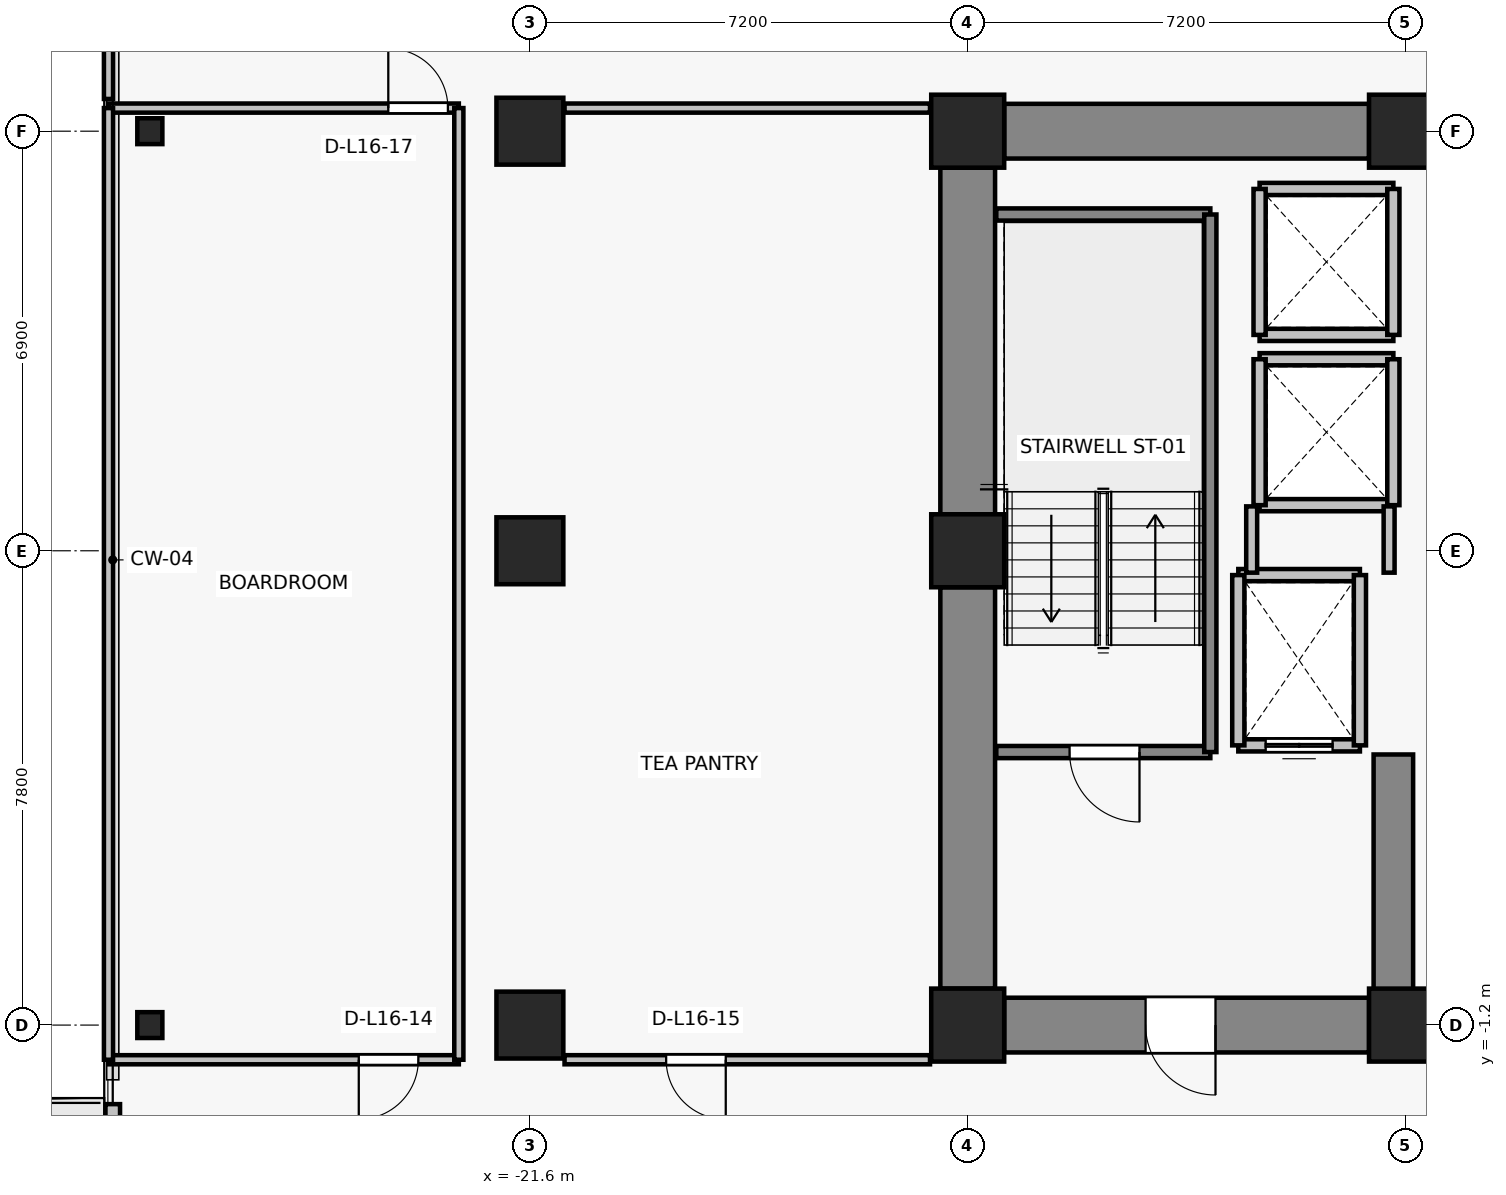
"""IFC4 building model, lengths in metres.
Left out: names, types, materials, properties, quantities, classifications, styles, units other than length and angle.
Written with IfcOpenShell. Run it as: python <this file> out.ifc"""

import sys

from ifc_helpers import new_model, si_unit, direction, frame, frame_2d, origin, origin_2d, place, context, subcontext, project, spatial, rectangle, i_section, extrude, source, transform, mapped, element, fill, save


model = new_model("IFC4")
c1 = context("Model", 3, precision=1e-05, world=origin(), true_north=direction((0.0, 1.0)))
c2 = subcontext(c1, "Body", "Model", "MODEL_VIEW")
j1 = project(units=[si_unit("LENGTHUNIT", "METRE"), si_unit("PLANEANGLEUNIT", "RADIAN")], contexts=[c1])
p1 = place(None, origin())
s1 = spatial("IfcSite", under=j1, at=p1, CompositionType="ELEMENT")
p2 = place(p1, origin())
s2 = spatial("IfcBuilding", under=s1, at=p2, CompositionType="ELEMENT")
p3 = place(p2, frame((0.0, 0.0, 60.4)))
s3 = spatial("IfcBuildingStorey", under=s2, at=p3, CompositionType="ELEMENT", Elevation=60.4)
for number, where, z_axis, x_axis in (
    (1, (-14.4, -1.2, 0.0), (0.0, 0.0, 1.0), (1.0, 0.0, 0.0)),
    (2, (-7.2, -1.2, 0.0), (0.0, 0.0, 1.0), (1.0, 0.0, 0.0)),
    (3, (-14.4, 6.6, 0.0), (0.0, 0.0, 1.0), (1.0, 0.0, 0.0)),
    (4, (-14.4, 13.5, 0.0), (0.0, 0.0, 1.0), (1.0, 0.0, 0.0)),
    (5, (-7.2, 13.5, 0.0), (0.0, 0.0, 1.0), (1.0, 0.0, 0.0)),
):
    element("IfcColumn", number, at=place(p3, frame(where, z_axis=z_axis, x_axis=x_axis)), inside=s3, PredefinedType="COLUMN", context=c2, shape_type="SweptSolid", body=[
        extrude(rectangle(XDim=1.2, YDim=1.2, at=origin_2d()), origin(), (0.0, 0.0, 1.0), 3.3),
    ])
for number, where, z_axis, x_axis in (
    (6, (-21.6, -1.2, 0.0), (0.0, 0.0, 1.0), (1.0, 0.0, 0.0)),
    (7, (-21.6, 6.6, 0.0), (0.0, 0.0, 1.0), (1.0, 0.0, 0.0)),
    (8, (-21.6, 13.5, 0.0), (0.0, 0.0, 1.0), (1.0, 0.0, 0.0)),
):
    element("IfcColumn", number, at=place(p3, frame(where, z_axis=z_axis, x_axis=x_axis)), inside=s3, PredefinedType="COLUMN", context=c2, shape_type="SweptSolid", body=[
        extrude(rectangle(XDim=1.1, YDim=1.1, at=origin_2d()), origin(), (0.0, 0.0, 1.0), 3.3),
    ])
for number, where, z_axis, x_axis in (
    (9, (-27.85, -1.2, 0.0), (0.0, 0.0, 1.0), (1.0, 0.0, 0.0)),
    (10, (-27.85, 13.5, 0.0), (0.0, 0.0, 1.0), (1.0, 0.0, 0.0)),
):
    element("IfcColumn", number, at=place(p3, frame(where, z_axis=z_axis, x_axis=x_axis)), inside=s3, PredefinedType="COLUMN", context=c2, shape_type="SweptSolid", body=[
        extrude(i_section(OverallWidth=0.412, OverallDepth=0.425, WebThickness=0.026, FlangeThickness=0.039, FilletRadius=0.015, at=origin_2d()), origin(), (0.0, 0.0, 1.0), 3.3),
    ])
p4 = place(p3, frame((-13.8, 13.5, 0.0), z_axis=(0.0, 0.0, 1.0), x_axis=(1.0, 0.0, 0.0)))
e11 = element("IfcWall", 11, at=p4, inside=s3, PredefinedType="SHEAR", context=c2, shape_type="SweptSolid", body=[
    extrude(rectangle(XDim=6.0, YDim=0.9, at=frame_2d((3.0, 0.0))), origin(), (0.0, 0.0, 1.0), 3.075),
])
p5 = place(p3, frame((-14.4, -0.6, 0.0), z_axis=(0.0, 0.0, 1.0), x_axis=(0.0, 1.0, 0.0)))
e12 = element("IfcWall", 12, at=p5, inside=s3, PredefinedType="SHEAR", context=c2, shape_type="SweptSolid", body=[
    extrude(rectangle(XDim=6.6, YDim=0.9, at=frame_2d((3.3, 0.0))), origin(), (0.0, 0.0, 1.0), 3.075),
])
p6 = place(p3, frame((-14.4, 7.2, 0.0), z_axis=(0.0, 0.0, 1.0), x_axis=(0.0, 1.0, 0.0)))
e13 = element("IfcWall", 13, at=p6, inside=s3, PredefinedType="SHEAR", context=c2, shape_type="SweptSolid", body=[
    extrude(rectangle(XDim=5.7, YDim=0.9, at=frame_2d((2.85, 0.0))), origin(), (0.0, 0.0, 1.0), 3.075),
])
p7 = place(p3, frame((-7.8, -1.2, 0.0), z_axis=(0.0, 0.0, 1.0), x_axis=(-1.0, 0.0, 0.0)))
e14 = element("IfcWall", 14, at=p7, inside=s3, PredefinedType="SHEAR", context=c2, shape_type="SweptSolid", body=[
    extrude(rectangle(XDim=6.0, YDim=0.9, at=frame_2d((3.0, 0.0))), origin(), (0.0, 0.0, 1.0), 3.075),
])
p8 = place(p7, frame((2.525, 0.0, 0.0)))
e15 = element("IfcOpeningElement", 15, at=p8, cuts=e14, PredefinedType="OPENING", context=c2, shape_type="SweptSolid", body=[
    extrude(rectangle(XDim=1.15, YDim=2.15, at=frame_2d((0.575, 1.075))), frame((0.0, 0.46, 0.0), z_axis=(0.0, -1.0, 0.0), x_axis=(1.0, 0.0, 0.0)), (0.0, 0.0, 1.0), 0.92),
])
p9 = place(p3, frame((-7.4, -0.75, 0.0), z_axis=(0.0, 0.0, 1.0), x_axis=(0.0, 1.0, 0.0)))
e16 = element("IfcWall", 16, at=p9, inside=s3, PredefinedType="SHEAR", context=c2, shape_type="SweptSolid", body=[
    extrude(rectangle(XDim=4.0, YDim=0.65, at=frame_2d((2.0, 0.0))), origin(), (0.0, 0.0, 1.0), 3.075),
])
p10 = place(p3, frame((-28.46, -8.3, 0.0), z_axis=(0.0, 0.0, 1.0), x_axis=(0.0, 1.0, 0.0)))
e17 = element("IfcWall", 17, at=p10, inside=s3, PredefinedType="SOLIDWALL", context=c2, shape_type="SweptSolid", body=[
    extrude(rectangle(XDim=5.8, YDim=0.24, at=frame_2d((2.9, 0.0))), origin(), (0.0, 0.0, 1.0), 3.075),
])
p11 = place(p10, frame((0.696, 0.0, 0.0)))
e18 = element("IfcOpeningElement", 18, at=p11, cuts=e17, PredefinedType="OPENING", context=c2, shape_type="SweptSolid", body=[
    extrude(rectangle(XDim=1.0, YDim=2.2, at=frame_2d((0.5, 1.1))), frame((0.0, 0.13, 0.0), z_axis=(0.0, -1.0, 0.0), x_axis=(1.0, 0.0, 0.0)), (0.0, 0.0, 1.0), 0.26),
])
p12 = place(p10, frame((2.046, 0.0, 0.85)))
e19 = element("IfcOpeningElement", 19, at=p12, cuts=e17, PredefinedType="OPENING", context=c2, shape_type="SweptSolid", body=[
    extrude(rectangle(XDim=1.2, YDim=1.5, at=frame_2d((0.6, 0.75))), frame((0.0, 0.13, 0.0), z_axis=(0.0, -1.0, 0.0), x_axis=(1.0, 0.0, 0.0)), (0.0, 0.0, 1.0), 0.26),
])
p13 = place(p3, frame((-7.95, 3.4, 0.0), z_axis=(0.0, 0.0, 1.0), x_axis=(-1.0, 0.0, 0.0)))
e20 = element("IfcWall", 20, at=p13, inside=s3, PredefinedType="SOLIDWALL", context=c2, shape_type="SweptSolid", body=[
    extrude(rectangle(XDim=2.0, YDim=0.2, at=frame_2d((1.0, 0.0))), origin(), (0.0, 0.0, 1.0), 3.075),
])
p14 = place(p13, frame((0.45, 0.0, 0.0)))
e21 = element("IfcOpeningElement", 21, at=p14, cuts=e20, PredefinedType="OPENING", context=c2, shape_type="SweptSolid", body=[
    extrude(rectangle(XDim=1.1, YDim=2.2, at=frame_2d((0.55, 1.1))), frame((0.0, 0.11, 0.0), z_axis=(0.0, -1.0, 0.0), x_axis=(1.0, 0.0, 0.0)), (0.0, 0.0, 1.0), 0.22),
])
p15 = place(p3, frame((-9.95, 6.2, 0.0), z_axis=(0.0, 0.0, 1.0), x_axis=(1.0, 0.0, 0.0)))
e22 = element("IfcWall", 22, at=p15, inside=s3, PredefinedType="SOLIDWALL", context=c2, shape_type="SweptSolid", body=[
    extrude(rectangle(XDim=2.0, YDim=0.2, at=frame_2d((1.0, 0.0))), origin(), (0.0, 0.0, 1.0), 3.075),
])
for number, where, z_axis, x_axis in (
    (23, (-9.95, 3.4, 0.0), (0.0, 0.0, 1.0), (0.0, 1.0, 0.0)),
    (24, (-7.95, 6.2, 0.0), (0.0, 0.0, 1.0), (0.0, -1.0, 0.0)),
):
    element("IfcWall", number, at=place(p3, frame(where, z_axis=z_axis, x_axis=x_axis)), inside=s3, PredefinedType="SOLIDWALL", context=c2, shape_type="SweptSolid", body=[
        extrude(rectangle(XDim=2.8, YDim=0.2, at=frame_2d((1.4, 0.0))), origin(), (0.0, 0.0, 1.0), 3.075),
    ])
for number, where, z_axis, x_axis in (
    (25, (-7.4, 7.35, 0.0), (0.0, 0.0, 1.0), (-1.0, 0.0, 0.0)),
    (26, (-9.6, 9.75, 0.0), (0.0, 0.0, 1.0), (1.0, 0.0, 0.0)),
):
    element("IfcWall", number, at=place(p3, frame(where, z_axis=z_axis, x_axis=x_axis)), inside=s3, PredefinedType="SOLIDWALL", context=c2, shape_type="SweptSolid", body=[
        extrude(rectangle(XDim=2.2, YDim=0.2, at=frame_2d((1.1, 0.0))), origin(), (0.0, 0.0, 1.0), 2.465),
    ])
p16 = place(p3, frame((-9.6, 7.35, 0.0), z_axis=(0.0, 0.0, 1.0), x_axis=(0.0, 1.0, 0.0)))
e27 = element("IfcWall", 27, at=p16, inside=s3, PredefinedType="SOLIDWALL", context=c2, shape_type="SweptSolid", body=[
    extrude(rectangle(XDim=2.4, YDim=0.2, at=frame_2d((1.2, 0.0))), origin(), (0.0, 0.0, 1.0), 3.075),
])
p17 = place(p3, frame((-7.4, 9.75, 0.0), z_axis=(0.0, 0.0, 1.0), x_axis=(0.0, -1.0, 0.0)))
e28 = element("IfcWall", 28, at=p17, inside=s3, PredefinedType="SOLIDWALL", context=c2, shape_type="SweptSolid", body=[
    extrude(rectangle(XDim=2.4, YDim=0.2, at=frame_2d((1.2, 0.0))), origin(), (0.0, 0.0, 1.0), 2.465),
])
for number, where, z_axis, x_axis in (
    (29, (-7.4, 10.15, 0.0), (0.0, 0.0, 1.0), (-1.0, 0.0, 0.0)),
    (30, (-9.6, 12.55, 0.0), (0.0, 0.0, 1.0), (1.0, 0.0, 0.0)),
):
    element("IfcWall", number, at=place(p3, frame(where, z_axis=z_axis, x_axis=x_axis)), inside=s3, PredefinedType="SOLIDWALL", context=c2, shape_type="SweptSolid", body=[
        extrude(rectangle(XDim=2.2, YDim=0.2, at=frame_2d((1.1, 0.0))), origin(), (0.0, 0.0, 1.0), 2.465),
    ])
p18 = place(p3, frame((-9.6, 10.15, 0.0), z_axis=(0.0, 0.0, 1.0), x_axis=(0.0, 1.0, 0.0)))
e31 = element("IfcWall", 31, at=p18, inside=s3, PredefinedType="SOLIDWALL", context=c2, shape_type="SweptSolid", body=[
    extrude(rectangle(XDim=2.4, YDim=0.2, at=frame_2d((1.2, 0.0))), origin(), (0.0, 0.0, 1.0), 3.075),
])
p19 = place(p3, frame((-7.4, 12.55, 0.0), z_axis=(0.0, 0.0, 1.0), x_axis=(0.0, -1.0, 0.0)))
e32 = element("IfcWall", 32, at=p19, inside=s3, PredefinedType="SOLIDWALL", context=c2, shape_type="SweptSolid", body=[
    extrude(rectangle(XDim=2.4, YDim=0.2, at=frame_2d((1.2, 0.0))), origin(), (0.0, 0.0, 1.0), 2.465),
])
p20 = place(p3, frame((-10.41, 3.29, 0.0), z_axis=(0.0, 0.0, 1.0), x_axis=(-1.0, 0.0, 0.0)))
e33 = element("IfcWall", 33, at=p20, inside=s3, PredefinedType="SOLIDWALL", context=c2, shape_type="SweptSolid", body=[
    extrude(rectangle(XDim=3.52, YDim=0.2, at=frame_2d((1.76, 0.0))), origin(), (0.0, 0.0, 1.0), 3.075),
])
p21 = place(p20, frame((1.165, 0.0, 0.0)))
e34 = element("IfcOpeningElement", 34, at=p21, cuts=e33, PredefinedType="OPENING", context=c2, shape_type="SweptSolid", body=[
    extrude(rectangle(XDim=1.15, YDim=2.15, at=frame_2d((0.575, 1.075))), frame((0.0, 0.11, 0.0), z_axis=(0.0, -1.0, 0.0), x_axis=(1.0, 0.0, 0.0)), (0.0, 0.0, 1.0), 0.22),
])
p22 = place(p3, frame((-13.93, 12.13, 0.0), z_axis=(0.0, 0.0, 1.0), x_axis=(1.0, 0.0, 0.0)))
e35 = element("IfcWall", 35, at=p22, inside=s3, PredefinedType="SOLIDWALL", context=c2, shape_type="SweptSolid", body=[
    extrude(rectangle(XDim=3.52, YDim=0.2, at=frame_2d((1.76, 0.0))), origin(), (0.0, 0.0, 1.0), 3.075),
])
p23 = place(p3, frame((-10.41, 12.13, 0.0), z_axis=(0.0, 0.0, 1.0), x_axis=(0.0, -1.0, 0.0)))
e36 = element("IfcWall", 36, at=p23, inside=s3, PredefinedType="SOLIDWALL", context=c2, shape_type="SweptSolid", body=[
    extrude(rectangle(XDim=8.84, YDim=0.2, at=frame_2d((4.42, 0.0))), origin(), (0.0, 0.0, 1.0), 3.075),
])
p24 = place(p3, frame((-9.73, 6.24, 0.0), z_axis=(0.0, 0.0, 1.0), x_axis=(0.0, 1.0, 0.0)))
e37 = element("IfcWall", 37, at=p24, inside=s3, PredefinedType="PARTITIONING", context=c2, shape_type="SweptSolid", body=[
    extrude(rectangle(XDim=1.09, YDim=0.18, at=frame_2d((0.545, 0.0))), origin(), (0.0, 0.0, 1.0), 3.075),
])
p25 = place(p3, frame((-7.47, 7.33, 0.0), z_axis=(0.0, 0.0, 1.0), x_axis=(0.0, -1.0, 0.0)))
e38 = element("IfcWall", 38, at=p25, inside=s3, PredefinedType="PARTITIONING", context=c2, shape_type="SweptSolid", body=[
    extrude(rectangle(XDim=1.09, YDim=0.18, at=frame_2d((0.545, 0.0))), origin(), (0.0, 0.0, 1.0), 2.465),
])
p26 = place(p3, frame((-22.769, -1.77, 0.0), z_axis=(0.0, 0.0, 1.0), x_axis=(-1.0, 0.0, 0.0)))
e39 = element("IfcWall", 39, at=p26, inside=s3, PredefinedType="PARTITIONING", context=c2, shape_type="SweptSolid", body=[
    extrude(rectangle(XDim=5.761, YDim=0.15, at=frame_2d((2.881, 0.0))), origin(), (0.0, 0.0, 1.0), 2.465),
])
p27 = place(p26, frame((0.666, 0.0, 0.0)))
e40 = element("IfcOpeningElement", 40, at=p27, cuts=e39, PredefinedType="OPENING", context=c2, shape_type="SweptSolid", body=[
    extrude(rectangle(XDim=0.98, YDim=2.15, at=frame_2d((0.49, 1.075))), frame((0.0, 0.085, 0.0), z_axis=(0.0, -1.0, 0.0), x_axis=(1.0, 0.0, 0.0)), (0.0, 0.0, 1.0), 0.17),
])
p28 = place(p3, frame((-28.53, 13.88, 0.0), z_axis=(0.0, 0.0, 1.0), x_axis=(1.0, 0.0, 0.0)))
e41 = element("IfcWall", 41, at=p28, inside=s3, PredefinedType="PARTITIONING", context=c2, shape_type="SweptSolid", body=[
    extrude(rectangle(XDim=5.761, YDim=0.15, at=frame_2d((2.881, 0.0))), origin(), (0.0, 0.0, 1.0), 3.075),
])
p29 = place(p28, frame((4.602, 0.0, 0.0)))
e42 = element("IfcOpeningElement", 42, at=p29, cuts=e41, PredefinedType="OPENING", context=c2, shape_type="SweptSolid", body=[
    extrude(rectangle(XDim=0.98, YDim=2.15, at=frame_2d((0.49, 1.075))), frame((0.0, 0.085, 0.0), z_axis=(0.0, -1.0, 0.0), x_axis=(1.0, 0.0, 0.0)), (0.0, 0.0, 1.0), 0.17),
])
p30 = place(p3, frame((-28.53, -1.77, 0.0), z_axis=(0.0, 0.0, 1.0), x_axis=(0.0, 1.0, 0.0)))
e43 = element("IfcWall", 43, at=p30, inside=s3, PredefinedType="PARTITIONING", context=c2, shape_type="SweptSolid", body=[
    extrude(rectangle(XDim=15.65, YDim=0.15, at=frame_2d((7.825, 0.0))), origin(), (0.0, 0.0, 1.0), 3.075),
])
p31 = place(p3, frame((-22.769, 13.88, 0.0), z_axis=(0.0, 0.0, 1.0), x_axis=(0.0, -1.0, 0.0)))
e44 = element("IfcWall", 44, at=p31, inside=s3, PredefinedType="PARTITIONING", context=c2, shape_type="SweptSolid", body=[
    extrude(rectangle(XDim=15.65, YDim=0.15, at=frame_2d((7.825, 0.0))), origin(), (0.0, 0.0, 1.0), 2.465),
])
p32 = place(p3, frame((-15.02, -1.77, 0.0), z_axis=(0.0, 0.0, 1.0), x_axis=(-1.0, 0.0, 0.0)))
e45 = element("IfcWall", 45, at=p32, inside=s3, PredefinedType="PARTITIONING", context=c2, shape_type="SweptSolid", body=[
    extrude(rectangle(XDim=6.01, YDim=0.15, at=frame_2d((3.005, 0.0))), origin(), (0.0, 0.0, 1.0), 3.075),
])
p33 = place(p32, frame((3.359, 0.0, 0.0)))
e46 = element("IfcOpeningElement", 46, at=p33, cuts=e45, PredefinedType="OPENING", context=c2, shape_type="SweptSolid", body=[
    extrude(rectangle(XDim=0.98, YDim=2.15, at=frame_2d((0.49, 1.075))), frame((0.0, 0.085, 0.0), z_axis=(0.0, -1.0, 0.0), x_axis=(1.0, 0.0, 0.0)), (0.0, 0.0, 1.0), 0.17),
])
p34 = place(p3, frame((-21.03, 13.88, 0.0), z_axis=(0.0, 0.0, 1.0), x_axis=(1.0, 0.0, 0.0)))
e47 = element("IfcWall", 47, at=p34, inside=s3, PredefinedType="PARTITIONING", context=c2, shape_type="SweptSolid", body=[
    extrude(rectangle(XDim=6.01, YDim=0.15, at=frame_2d((3.005, 0.0))), origin(), (0.0, 0.0, 1.0), 3.075),
])
p35 = place(p3, frame((-28.53, 14.03, 0.0), z_axis=(0.0, 0.0, 1.0), x_axis=(0.0, 1.0, 0.0)))
e48 = element("IfcWall", 48, at=p35, inside=s3, PredefinedType="PARTITIONING", context=c2, shape_type="SweptSolid", body=[
    extrude(rectangle(XDim=4.1, YDim=0.15, at=frame_2d((2.05, 0.0))), origin(), (0.0, 0.0, 1.0), 3.075),
])
m1 = source(origin(), c2, "Body", "SweptSolid", [
    extrude(rectangle(XDim=1.1, YDim=2.2, at=frame_2d((0.55, 1.1))), frame((0.0, 0.025, 0.0), z_axis=(0.0, -1.0, 0.0), x_axis=(1.0, 0.0, 0.0)), (0.0, 0.0, 1.0), 0.05),
])
p36 = place(p14, origin())
e49 = element("IfcDoor", 49, at=p36, inside=s3, OperationType="DOUBLE_DOOR_SLIDING", PredefinedType="DOOR", context=c2, shape_type="MappedRepresentation", body=[
    mapped(m1, transform((0.0, 0.0, 0.0), x_axis=(1.0, 0.0, 0.0), y_axis=(0.0, 1.0, 0.0), z_axis=(0.0, 0.0, 1.0), scale=1.0)),
])
fill(e21, e49)
m2 = source(origin(), c2, "Body", "SweptSolid", [
    extrude(rectangle(XDim=1.15, YDim=2.15, at=frame_2d((0.575, 1.075))), frame((0.0, 0.025, 0.0), z_axis=(0.0, -1.0, 0.0), x_axis=(1.0, 0.0, 0.0)), (0.0, 0.0, 1.0), 0.05),
])
p37 = place(p21, origin())
e50 = element("IfcDoor", 50, at=p37, inside=s3, OperationType="SINGLE_SWING_LEFT", PredefinedType="DOOR", context=c2, shape_type="MappedRepresentation", body=[
    mapped(m2, transform((0.0, 0.0, 0.0), x_axis=(1.0, 0.0, 0.0), y_axis=(0.0, 1.0, 0.0), z_axis=(0.0, 0.0, 1.0), scale=1.0)),
])
fill(e34, e50)
p38 = place(p8, origin())
e51 = element("IfcDoor", 51, at=p38, inside=s3, OperationType="SINGLE_SWING_LEFT", PredefinedType="DOOR", context=c2, shape_type="MappedRepresentation", body=[
    mapped(m2, transform((0.0, 0.0, 0.0), x_axis=(1.0, 0.0, 0.0), y_axis=(0.0, 1.0, 0.0), z_axis=(0.0, 0.0, 1.0), scale=1.0)),
])
fill(e15, e51)
m3 = source(origin(), c2, "Body", "SweptSolid", [
    extrude(rectangle(XDim=0.98, YDim=2.15, at=frame_2d((0.49, 1.075))), frame((0.0, 0.025, 0.0), z_axis=(0.0, -1.0, 0.0), x_axis=(1.0, 0.0, 0.0)), (0.0, 0.0, 1.0), 0.05),
])
p39 = place(p27, origin())
e52 = element("IfcDoor", 52, at=p39, inside=s3, OperationType="SINGLE_SWING_RIGHT", PredefinedType="DOOR", context=c2, shape_type="MappedRepresentation", body=[
    mapped(m3, transform((0.0, 0.0, 0.0), x_axis=(1.0, 0.0, 0.0), y_axis=(0.0, 1.0, 0.0), z_axis=(0.0, 0.0, 1.0), scale=1.0)),
])
fill(e40, e52)
p40 = place(p33, origin())
e53 = element("IfcDoor", 53, at=p40, inside=s3, OperationType="SINGLE_SWING_LEFT", PredefinedType="DOOR", context=c2, shape_type="MappedRepresentation", body=[
    mapped(m3, transform((0.0, 0.0, 0.0), x_axis=(1.0, 0.0, 0.0), y_axis=(0.0, 1.0, 0.0), z_axis=(0.0, 0.0, 1.0), scale=1.0)),
])
fill(e46, e53)
p41 = place(p29, origin())
e54 = element("IfcDoor", 54, at=p41, inside=s3, OperationType="SINGLE_SWING_LEFT", PredefinedType="DOOR", context=c2, shape_type="MappedRepresentation", body=[
    mapped(m3, transform((0.0, 0.0, 0.0), x_axis=(1.0, 0.0, 0.0), y_axis=(0.0, 1.0, 0.0), z_axis=(0.0, 0.0, 1.0), scale=1.0)),
])
fill(e42, e54)
save(model, sys.argv[1])
